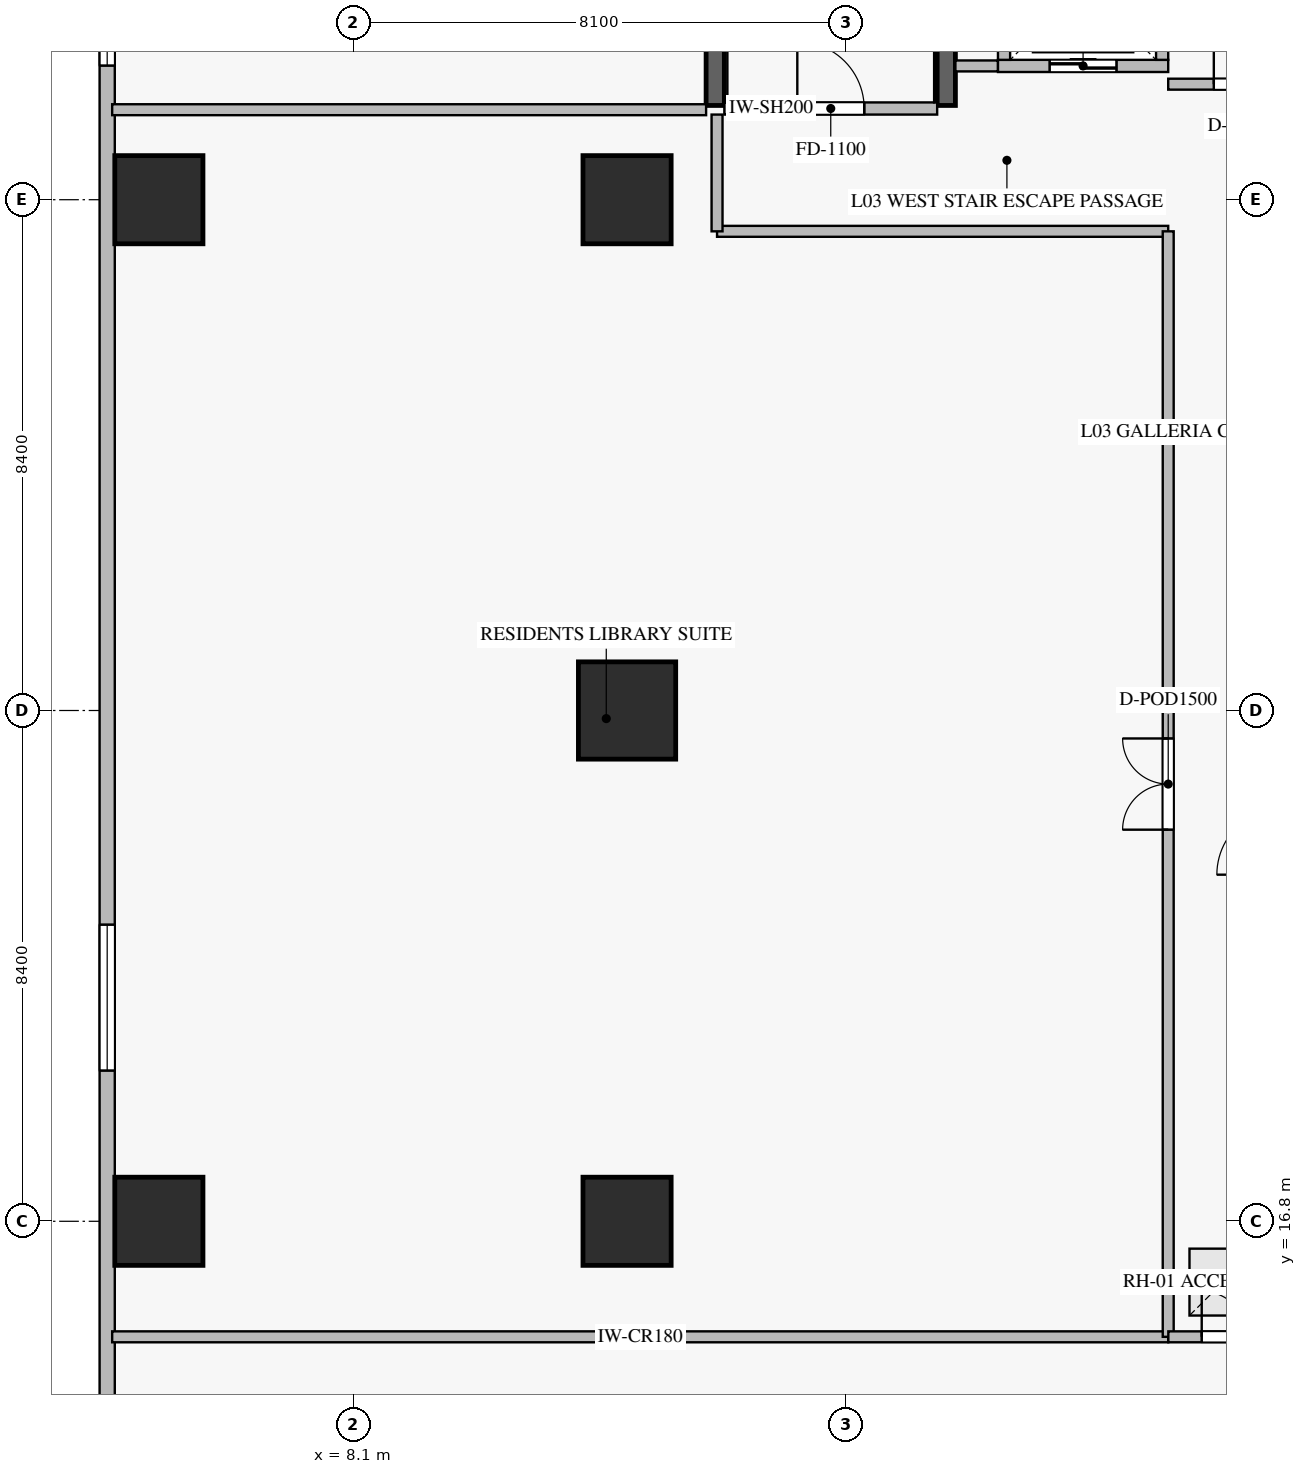
"""IFC4 building model, lengths in metres.
Left out: names, types, materials, properties, quantities, classifications, styles, units other than length and angle.
Written with IfcOpenShell. Run it as: python <this file> out.ifc"""

import sys

from ifc_helpers import new_model, si_unit, direction, frame, frame_2d, origin, origin_2d, place, context, subcontext, project, spatial, rectangle, extrude, source, transform, mapped, element, fill, save


model = new_model("IFC4")
c1 = context("Model", 3, precision=1e-05, world=origin(), true_north=direction((0.0, 1.0)))
c2 = subcontext(c1, "Body", "Model", "MODEL_VIEW")
j1 = project(units=[si_unit("LENGTHUNIT", "METRE"), si_unit("PLANEANGLEUNIT", "RADIAN")], contexts=[c1])
p1 = place(None, origin())
s1 = spatial("IfcSite", under=j1, at=p1, CompositionType="ELEMENT")
p2 = place(p1, origin())
s2 = spatial("IfcBuilding", under=s1, at=p2, CompositionType="ELEMENT")
p3 = place(p2, frame((0.0, 0.0, 15.3)))
s3 = spatial("IfcBuildingStorey", under=s2, at=p3, CompositionType="ELEMENT", Elevation=15.3)
m1 = source(origin(), c2, "Body", "SweptSolid", [
    extrude(rectangle(XDim=1.45, YDim=1.45, at=origin_2d()), origin(), (0.0, 0.0, 1.0), 5.23),
])
p4 = place(p3, frame((12.6, 16.8, -0.38), z_axis=(0.0, 0.0, 1.0), x_axis=(1.0, 0.0, 0.0)))
e1 = element("IfcColumn", 1, at=p4, inside=s3, PredefinedType="COLUMN", context=c2, shape_type="MappedRepresentation", body=[
    mapped(m1, transform((0.0, 0.0, 0.0), scale=1.0)),
])
m2 = source(origin(), c2, "Body", "SweptSolid", [
    extrude(rectangle(XDim=1.6, YDim=1.6, at=origin_2d()), origin(), (0.0, 0.0, 1.0), 5.23),
])
p5 = place(p3, frame((12.6, 25.2, -0.38), z_axis=(0.0, 0.0, 1.0), x_axis=(1.0, 0.0, 0.0)))
e2 = element("IfcColumn", 2, at=p5, inside=s3, PredefinedType="COLUMN", context=c2, shape_type="MappedRepresentation", body=[
    mapped(m2, transform((0.0, 0.0, 0.0), scale=1.0)),
])
for number, where, z_axis, x_axis in (
    (3, (12.6, 33.6, -0.38), (0.0, 0.0, 1.0), (1.0, 0.0, 0.0)),
    (4, (4.9, 16.8, -0.38), (0.0, 0.0, 1.0), (1.0, 0.0, 0.0)),
    (5, (4.9, 33.6, -0.38), (0.0, 0.0, 1.0), (1.0, 0.0, 0.0)),
):
    element("IfcColumn", number, at=place(p3, frame(where, z_axis=z_axis, x_axis=x_axis)), inside=s3, PredefinedType="COLUMN", context=c2, shape_type="MappedRepresentation", body=[
        mapped(m1, transform((0.0, 0.0, 0.0), scale=1.0)),
    ])
p6 = place(p3, frame((4.05, 46.075, 0.0), z_axis=(0.0, 0.0, 1.0), x_axis=(0.0, -1.0, 0.0)))
e6 = element("IfcWall", 6, at=p6, inside=s3, PredefinedType="ELEMENTEDWALL", context=c2, shape_type="SweptSolid", body=[
    extrude(rectangle(XDim=41.75, YDim=0.25, at=frame_2d((20.875, 0.0))), origin(), (0.0, 0.0, 1.0), 4.835),
])
p7 = place(p6, frame((7.87, 0.0, 0.6)))
e7 = element("IfcOpeningElement", 7, at=p7, cuts=e6, PredefinedType="OPENING", context=c2, shape_type="SweptSolid", body=[
    extrude(rectangle(XDim=2.4, YDim=2.6, at=frame_2d((1.2, 1.3))), frame((0.0, 0.135, 0.0), z_axis=(0.0, -1.0, 0.0), x_axis=(1.0, 0.0, 0.0)), (0.0, 0.0, 1.0), 0.27),
])
p8 = place(p6, frame((24.397, 0.0, 0.6)))
e8 = element("IfcOpeningElement", 8, at=p8, cuts=e6, PredefinedType="OPENING", context=c2, shape_type="SweptSolid", body=[
    extrude(rectangle(XDim=2.4, YDim=2.6, at=frame_2d((1.2, 1.3))), frame((0.0, 0.135, 0.0), z_axis=(0.0, -1.0, 0.0), x_axis=(1.0, 0.0, 0.0)), (0.0, 0.0, 1.0), 0.27),
])
for number, where, z_axis, x_axis in (
    (9, (14.05, 35.15, -0.38), (0.0, 0.0, 1.0), (0.0, 1.0, 0.0)),
    (10, (17.85, 35.15, -0.38), (0.0, 0.0, 1.0), (0.0, 1.0, 0.0)),
):
    element("IfcWall", number, at=place(p3, frame(where, z_axis=z_axis, x_axis=x_axis)), inside=s3, PredefinedType="SHEAR", context=c2, shape_type="SweptSolid", body=[
        extrude(rectangle(XDim=7.9, YDim=0.3, at=frame_2d((3.95, 0.0))), origin(), (0.0, 0.0, 1.0), 5.228),
    ])
p9 = place(p3, frame((14.2, 35.1, 0.0), z_axis=(0.0, 0.0, 1.0), x_axis=(1.0, 0.0, 0.0)))
e11 = element("IfcWall", 11, at=p9, inside=s3, PredefinedType="STANDARD", context=c2, shape_type="SweptSolid", body=[
    extrude(rectangle(XDim=3.5, YDim=0.2, at=frame_2d((1.75, 0.0))), origin(), (0.0, 0.0, 1.0), 4.85),
])
p10 = place(p9, frame((1.2, 0.0, 0.0)))
e12 = element("IfcOpeningElement", 12, at=p10, cuts=e11, PredefinedType="OPENING", context=c2, shape_type="SweptSolid", body=[
    extrude(rectangle(XDim=1.1, YDim=2.15, at=frame_2d((0.55, 1.075))), frame((0.0, 0.11, 0.0), z_axis=(0.0, -1.0, 0.0), x_axis=(1.0, 0.0, 0.0)), (0.0, 0.0, 1.0), 0.22),
])
p11 = place(p3, frame((18.7, 35.8, 0.0), z_axis=(0.0, 0.0, 1.0), x_axis=(1.0, 0.0, 0.0)))
e13 = element("IfcWall", 13, at=p11, inside=s3, PredefinedType="STANDARD", context=c2, shape_type="SweptSolid", body=[
    extrude(rectangle(XDim=2.8, YDim=0.2, at=frame_2d((1.4, 0.0))), origin(), (0.0, 0.0, 1.0), 4.85),
])
p12 = place(p11, frame((0.85, 0.0, 0.0)))
e14 = element("IfcOpeningElement", 14, at=p12, cuts=e13, PredefinedType="OPENING", context=c2, shape_type="SweptSolid", body=[
    extrude(rectangle(XDim=1.1, YDim=2.2, at=frame_2d((0.55, 1.1))), frame((0.0, 0.11, 0.0), z_axis=(0.0, -1.0, 0.0), x_axis=(1.0, 0.0, 0.0)), (0.0, 0.0, 1.0), 0.22),
])
for number, where, z_axis, x_axis in (
    (15, (18.8, 35.9, 0.0), (0.0, 0.0, 1.0), (0.0, 1.0, 0.0)),
    (16, (21.4, 35.9, 0.0), (0.0, 0.0, 1.0), (0.0, 1.0, 0.0)),
):
    element("IfcWall", number, at=place(p3, frame(where, z_axis=z_axis, x_axis=x_axis)), inside=s3, PredefinedType="STANDARD", context=c2, shape_type="SweptSolid", body=[
        extrude(rectangle(XDim=2.4, YDim=0.2, at=frame_2d((1.2, 0.0))), origin(), (0.0, 0.0, 1.0), 4.85),
    ])
p13 = place(p3, frame((4.132, 14.9, 0.0), z_axis=(0.0, 0.0, 1.0), x_axis=(1.0, 0.0, 0.0)))
e17 = element("IfcWall", 17, at=p13, inside=s3, PredefinedType="PARTITIONING", context=c2, shape_type="SweptSolid", body=[
    extrude(rectangle(XDim=17.368, YDim=0.18, at=frame_2d((8.684, 0.0))), origin(), (0.0, 0.0, 1.0), 4.85),
])
p14 = place(p3, frame((4.132, 35.08, 0.0), z_axis=(0.0, 0.0, 1.0), x_axis=(1.0, 0.0, 0.0)))
e18 = element("IfcWall", 18, at=p14, inside=s3, PredefinedType="PARTITIONING", context=c2, shape_type="SweptSolid", body=[
    extrude(rectangle(XDim=9.768, YDim=0.18, at=frame_2d((4.884, 0.0))), origin(), (0.0, 0.0, 1.0), 4.85),
])
p15 = place(p3, frame((14.08, 33.08, 0.0), z_axis=(0.0, 0.0, 1.0), x_axis=(1.0, 0.0, 0.0)))
e19 = element("IfcWall", 19, at=p15, inside=s3, PredefinedType="PARTITIONING", context=c2, shape_type="SweptSolid", body=[
    extrude(rectangle(XDim=7.42, YDim=0.18, at=frame_2d((3.71, 0.0))), origin(), (0.0, 0.0, 1.0), 4.85),
])
p16 = place(p3, frame((18.0, 35.8, 0.0), z_axis=(0.0, 0.0, 1.0), x_axis=(1.0, 0.0, 0.0)))
e20 = element("IfcWall", 20, at=p16, inside=s3, PredefinedType="PARTITIONING", context=c2, shape_type="SweptSolid", body=[
    extrude(rectangle(XDim=0.698, YDim=0.18, at=frame_2d((0.349, 0.0))), origin(), (0.0, 0.0, 1.0), 4.85),
])
p17 = place(p3, frame((14.08, 33.08, 0.0), z_axis=(0.0, 0.0, 1.0), x_axis=(0.0, 1.0, 0.0)))
e21 = element("IfcWall", 21, at=p17, inside=s3, PredefinedType="PARTITIONING", context=c2, shape_type="SweptSolid", body=[
    extrude(rectangle(XDim=1.92, YDim=0.18, at=frame_2d((0.96, 0.0))), origin(), (0.0, 0.0, 1.0), 4.85),
])
p18 = place(p3, frame((21.5, 14.9, 0.0), z_axis=(0.0, 0.0, 1.0), x_axis=(0.0, 1.0, 0.0)))
e22 = element("IfcWall", 22, at=p18, inside=s3, PredefinedType="PARTITIONING", context=c2, shape_type="SweptSolid", body=[
    extrude(rectangle(XDim=18.18, YDim=0.18, at=frame_2d((9.09, 0.0))), origin(), (0.0, 0.0, 1.0), 4.85),
])
p19 = place(p18, frame((8.34, 0.0, 0.0)))
e23 = element("IfcOpeningElement", 23, at=p19, cuts=e22, PredefinedType="OPENING", context=c2, shape_type="SweptSolid", body=[
    extrude(rectangle(XDim=1.5, YDim=2.25, at=frame_2d((0.75, 1.125))), frame((0.0, 0.1, 0.0), z_axis=(0.0, -1.0, 0.0), x_axis=(1.0, 0.0, 0.0)), (0.0, 0.0, 1.0), 0.2),
])
p20 = place(p3, frame((21.502, 14.9, 0.0), z_axis=(0.0, 0.0, 1.0), x_axis=(1.0, 0.0, 0.0)))
e24 = element("IfcWall", 24, at=p20, inside=s3, PredefinedType="PARTITIONING", context=c2, shape_type="SweptSolid", body=[
    extrude(rectangle(XDim=2.598, YDim=0.18, at=frame_2d((1.299, 0.0))), origin(), (0.0, 0.0, 1.0), 4.85),
])
p21 = place(p20, frame((0.549, 0.0, 0.0)))
e25 = element("IfcOpeningElement", 25, at=p21, cuts=e24, PredefinedType="OPENING", context=c2, shape_type="SweptSolid", body=[
    extrude(rectangle(XDim=1.5, YDim=2.25, at=frame_2d((0.75, 1.125))), frame((0.0, 0.1, 0.0), z_axis=(0.0, -1.0, 0.0), x_axis=(1.0, 0.0, 0.0)), (0.0, 0.0, 1.0), 0.2),
])
p22 = place(p3, frame((21.5, 35.5, 0.0), z_axis=(0.0, 0.0, 1.0), x_axis=(1.0, 0.0, 0.0)))
e26 = element("IfcWall", 26, at=p22, inside=s3, PredefinedType="PARTITIONING", context=c2, shape_type="SweptSolid", body=[
    extrude(rectangle(XDim=2.9, YDim=0.18, at=frame_2d((1.45, 0.0))), origin(), (0.0, 0.0, 1.0), 4.85),
])
p23 = place(p22, frame((0.75, 0.0, 0.0)))
e27 = element("IfcOpeningElement", 27, at=p23, cuts=e26, PredefinedType="OPENING", context=c2, shape_type="SweptSolid", body=[
    extrude(rectangle(XDim=1.4, YDim=2.25, at=frame_2d((0.7, 1.125))), frame((0.0, 0.1, 0.0), z_axis=(0.0, -1.0, 0.0), x_axis=(1.0, 0.0, 0.0)), (0.0, 0.0, 1.0), 0.2),
])
m3 = source(origin(), c2, "Body", "SweptSolid", [
    extrude(rectangle(XDim=2.4, YDim=2.6, at=frame_2d((1.2, 1.3))), frame((0.0, 0.03, 0.0), z_axis=(0.0, -1.0, 0.0), x_axis=(1.0, 0.0, 0.0)), (0.0, 0.0, 1.0), 0.06),
])
p24 = place(p7, origin())
e28 = element("IfcWindow", 28, at=p24, inside=s3, PartitioningType="SINGLE_PANEL", PredefinedType="WINDOW", context=c2, shape_type="MappedRepresentation", body=[
    mapped(m3, transform((0.0, 0.0, 0.0), scale=1.0)),
])
fill(e7, e28)
p25 = place(p8, origin())
e29 = element("IfcWindow", 29, at=p25, inside=s3, PartitioningType="SINGLE_PANEL", PredefinedType="WINDOW", context=c2, shape_type="MappedRepresentation", body=[
    mapped(m3, transform((0.0, 0.0, 0.0), scale=1.0)),
])
fill(e8, e29)
p26 = place(p2, frame((0.0, 0.0, 21.0)))
p27 = place(p26, frame((0.0, 0.0, -0.85)))
p28 = place(p27, frame((22.4, 15.8, 0.0)))
p29 = place(p28, frame((0.0, 0.0, 0.81)))
e30 = element("IfcDoor", 30, at=p29, inside=s3, OperationType="SINGLE_SWING_LEFT", PredefinedType="TRAPDOOR", context=c2, shape_type="SweptSolid", body=[
    extrude(rectangle(XDim=1.1, YDim=1.1, at=origin_2d()), origin(), (0.0, 0.0, 1.0), 0.04),
])
m4 = source(origin(), c2, "Body", "SweptSolid", [
    extrude(rectangle(XDim=1.1, YDim=2.15, at=frame_2d((0.55, 1.075))), frame((0.0, 0.025, 0.0), z_axis=(0.0, -1.0, 0.0), x_axis=(1.0, 0.0, 0.0)), (0.0, 0.0, 1.0), 0.05),
])
p30 = place(p10, origin())
e31 = element("IfcDoor", 31, at=p30, inside=s3, OperationType="SINGLE_SWING_LEFT", PredefinedType="DOOR", context=c2, shape_type="MappedRepresentation", body=[
    mapped(m4, transform((0.0, 0.0, 0.0), scale=1.0)),
])
fill(e12, e31)
m5 = source(origin(), c2, "Body", "SweptSolid", [
    extrude(rectangle(XDim=1.1, YDim=2.2, at=frame_2d((0.55, 1.1))), frame((0.0, 0.025, 0.0), z_axis=(0.0, -1.0, 0.0), x_axis=(1.0, 0.0, 0.0)), (0.0, 0.0, 1.0), 0.05),
])
p31 = place(p12, origin())
e32 = element("IfcDoor", 32, at=p31, inside=s3, OperationType="DOUBLE_DOOR_SLIDING", PredefinedType="DOOR", context=c2, shape_type="MappedRepresentation", body=[
    mapped(m5, transform((0.0, 0.0, 0.0), scale=1.0)),
])
fill(e14, e32)
m6 = source(origin(), c2, "Body", "SweptSolid", [
    extrude(rectangle(XDim=1.5, YDim=2.25, at=frame_2d((0.75, 1.125))), frame((0.0, 0.025, 0.0), z_axis=(0.0, -1.0, 0.0), x_axis=(1.0, 0.0, 0.0)), (0.0, 0.0, 1.0), 0.05),
])
p32 = place(p19, origin())
e33 = element("IfcDoor", 33, at=p32, inside=s3, OperationType="DOUBLE_DOOR_SINGLE_SWING", PredefinedType="DOOR", context=c2, shape_type="MappedRepresentation", body=[
    mapped(m6, transform((0.0, 0.0, 0.0), scale=1.0)),
])
fill(e23, e33)
p33 = place(p21, origin())
e34 = element("IfcDoor", 34, at=p33, inside=s3, OperationType="DOUBLE_DOOR_SINGLE_SWING", PredefinedType="DOOR", context=c2, shape_type="MappedRepresentation", body=[
    mapped(m6, transform((0.0, 0.0, 0.0), scale=1.0)),
])
fill(e25, e34)
m7 = source(origin(), c2, "Body", "SweptSolid", [
    extrude(rectangle(XDim=1.4, YDim=2.25, at=frame_2d((0.7, 1.125))), frame((0.0, 0.025, 0.0), z_axis=(0.0, -1.0, 0.0), x_axis=(1.0, 0.0, 0.0)), (0.0, 0.0, 1.0), 0.05),
])
p34 = place(p23, origin())
e35 = element("IfcDoor", 35, at=p34, inside=s3, OperationType="DOUBLE_DOOR_SINGLE_SWING", PredefinedType="DOOR", context=c2, shape_type="MappedRepresentation", body=[
    mapped(m7, transform((0.0, 0.0, 0.0), scale=1.0)),
])
fill(e27, e35)
save(model, sys.argv[1])
